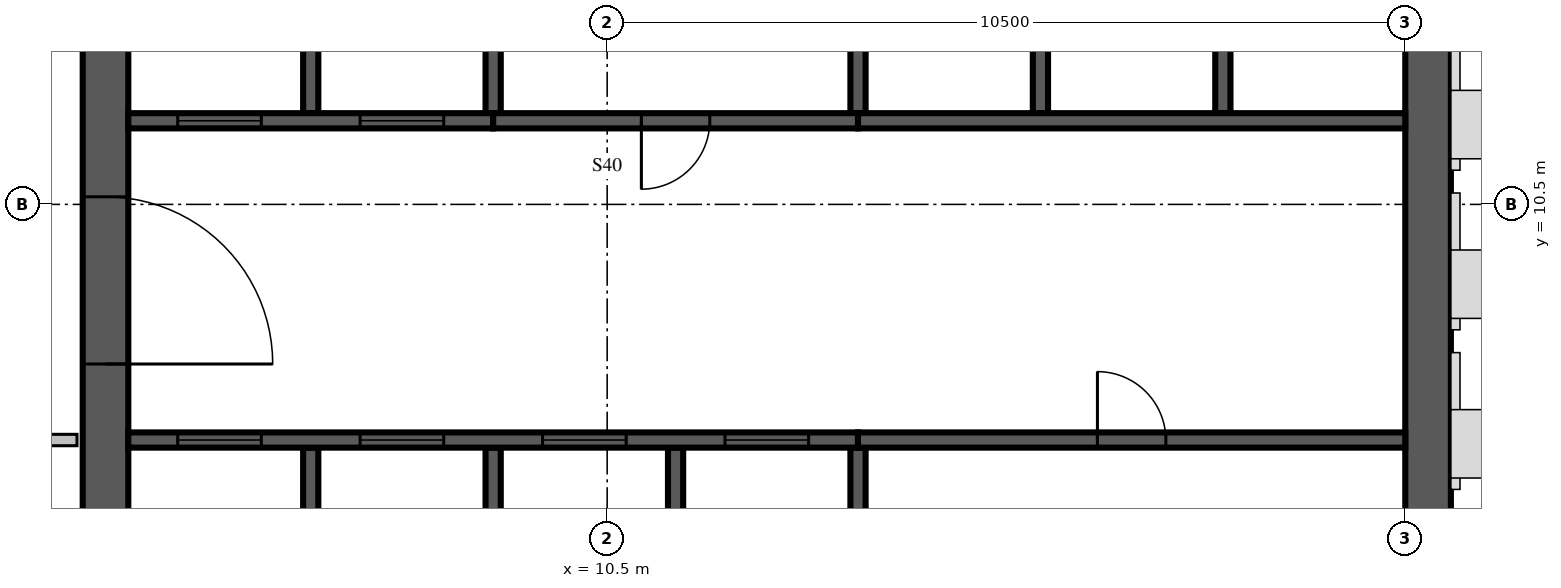
"""IFC4 building model, lengths in metres.
Left out: names, types, materials, properties, quantities, classifications, styles, units other than length and angle.
Written with IfcOpenShell. Run it as: python <this file> out.ifc"""

import sys

from ifc_helpers import new_model, si_unit, direction, frame, frame_2d, origin, place, context, subcontext, project, spatial, rectangle, extrude, source, transform, mapped, element, fill, save


model = new_model("IFC4")
c1 = context("Model", 3, precision=1e-05, world=origin(), true_north=direction((0.0, 1.0)))
c2 = subcontext(c1, "Body", "Model", "MODEL_VIEW")
j1 = project(units=[si_unit("LENGTHUNIT", "METRE"), si_unit("PLANEANGLEUNIT", "RADIAN")], contexts=[c1])
p1 = place(None, origin())
s1 = spatial("IfcSite", under=j1, at=p1, CompositionType="ELEMENT")
p2 = place(p1, origin())
s2 = spatial("IfcBuilding", under=s1, at=p2, CompositionType="ELEMENT")
p3 = place(p2, frame((0.0, 0.0, 344.0)))
s3 = spatial("IfcBuildingStorey", under=s2, at=p3, CompositionType="ELEMENT", Elevation=344.0)
m1 = source(origin(), c2, "Body", "SweptSolid", [
    extrude(rectangle(XDim=17.4, YDim=0.6, at=frame_2d((8.7, 0.0))), origin(), (0.0, 0.0, 1.0), 3.5),
])
p4 = place(p3, frame((3.9, 4.2, 0.0), z_axis=(0.0, 0.0, 1.0), x_axis=(0.0, 1.0, 0.0)))
e1 = element("IfcWall", 1, at=p4, inside=s3, PredefinedType="SHEAR", context=c2, shape_type="MappedRepresentation", body=[
    mapped(m1, transform((0.0, 0.0, 0.0), scale=1.0)),
])
m2 = source(origin(), c2, "Body", "SweptSolid", [
    extrude(rectangle(XDim=2.2, YDim=2.1, at=frame_2d((1.1, 1.05))), frame((0.0, 0.31, 0.0), z_axis=(0.0, -1.0, 0.0), x_axis=(1.0, 0.0, 0.0)), (0.0, 0.0, 1.0), 0.62),
])
p5 = place(p4, frame((4.2, 0.0, 0.0)))
e2 = element("IfcOpeningElement", 2, at=p5, cuts=e1, PredefinedType="OPENING", context=c2, shape_type="MappedRepresentation", body=[
    mapped(m2, transform((0.0, 0.0, 0.0), scale=1.0)),
])
m3 = source(origin(), c2, "Body", "SweptSolid", [
    extrude(rectangle(XDim=16.8, YDim=0.6, at=frame_2d((8.4, 0.0))), origin(), (0.0, 0.0, 1.0), 3.5),
])
p6 = place(p3, frame((21.3, 4.2, 0.0), z_axis=(0.0, 0.0, 1.0), x_axis=(0.0, 1.0, 0.0)))
e3 = element("IfcWall", 3, at=p6, inside=s3, PredefinedType="SHEAR", context=c2, shape_type="MappedRepresentation", body=[
    mapped(m3, transform((0.0, 0.0, 0.0), scale=1.0)),
])
m4 = source(origin(), c2, "Body", "SweptSolid", [
    extrude(rectangle(XDim=1.2, YDim=2.4, at=frame_2d((0.6, 1.2))), frame((0.0, 0.31, 0.0), z_axis=(0.0, -1.0, 0.0), x_axis=(1.0, 0.0, 0.0)), (0.0, 0.0, 1.0), 0.62),
])
p7 = place(p6, frame((12.0, 0.0, 0.6)))
e4 = element("IfcOpeningElement", 4, at=p7, cuts=e3, PredefinedType="OPENING", context=c2, shape_type="MappedRepresentation", body=[
    mapped(m4, transform((0.0, 0.0, 0.0), scale=1.0)),
])
m5 = source(origin(), c2, "Body", "SweptSolid", [
    extrude(rectangle(XDim=3.1, YDim=0.2, at=frame_2d((1.55, 0.0))), origin(), (0.0, 0.0, 1.0), 3.5),
])
for number, where, z_axis, x_axis in (
    (5, (6.6, 4.2, 0.0), (0.0, 0.0, 1.0), (0.0, 1.0, 0.0)),
    (6, (9.0, 4.2, 0.0), (0.0, 0.0, 1.0), (0.0, 1.0, 0.0)),
    (7, (11.4, 4.2, 0.0), (0.0, 0.0, 1.0), (0.0, 1.0, 0.0)),
):
    element("IfcWall", number, at=place(p3, frame(where, z_axis=z_axis, x_axis=x_axis)), inside=s3, PredefinedType="SOLIDWALL", context=c2, shape_type="MappedRepresentation", body=[
        mapped(m5, transform((0.0, 0.0, 0.0), scale=1.0)),
    ])
m6 = source(origin(), c2, "Body", "SweptSolid", [
    extrude(rectangle(XDim=3.1, YDim=0.2, at=frame_2d((1.55, 0.0))), origin(), (0.0, 0.0, 1.0), 3.1),
])
p8 = place(p3, frame((13.8, 4.2, 0.0), z_axis=(0.0, 0.0, 1.0), x_axis=(0.0, 1.0, 0.0)))
e8 = element("IfcWall", 8, at=p8, inside=s3, PredefinedType="SOLIDWALL", context=c2, shape_type="MappedRepresentation", body=[
    mapped(m6, transform((0.0, 0.0, 0.0), scale=1.0)),
])
m7 = source(origin(), c2, "Body", "SweptSolid", [
    extrude(rectangle(XDim=3.0, YDim=0.2, at=frame_2d((1.5, 0.0))), origin(), (0.0, 0.0, 1.0), 3.5),
])
p9 = place(p3, frame((6.6, 11.7, 0.0), z_axis=(0.0, 0.0, 1.0), x_axis=(0.0, 1.0, 0.0)))
e9 = element("IfcWall", 9, at=p9, inside=s3, PredefinedType="SOLIDWALL", context=c2, shape_type="MappedRepresentation", body=[
    mapped(m7, transform((0.0, 0.0, 0.0), scale=1.0)),
])
m8 = source(origin(), c2, "Body", "SweptSolid", [
    extrude(rectangle(XDim=3.0, YDim=0.2, at=frame_2d((1.5, 0.0))), origin(), (0.0, 0.0, 1.0), 3.1),
])
for number, where, z_axis, x_axis in (
    (10, (9.0, 11.7, 0.0), (0.0, 0.0, 1.0), (0.0, 1.0, 0.0)),
    (11, (13.8, 11.7, 0.0), (0.0, 0.0, 1.0), (0.0, 1.0, 0.0)),
):
    element("IfcWall", number, at=place(p3, frame(where, z_axis=z_axis, x_axis=x_axis)), inside=s3, PredefinedType="SOLIDWALL", context=c2, shape_type="MappedRepresentation", body=[
        mapped(m8, transform((0.0, 0.0, 0.0), scale=1.0)),
    ])
for number, where, z_axis, x_axis in (
    (12, (16.2, 11.7, 0.0), (0.0, 0.0, 1.0), (0.0, 1.0, 0.0)),
    (13, (18.6, 11.7, 0.0), (0.0, 0.0, 1.0), (0.0, 1.0, 0.0)),
):
    element("IfcWall", number, at=place(p3, frame(where, z_axis=z_axis, x_axis=x_axis)), inside=s3, PredefinedType="SOLIDWALL", context=c2, shape_type="MappedRepresentation", body=[
        mapped(m7, transform((0.0, 0.0, 0.0), scale=1.0)),
    ])
m9 = source(origin(), c2, "Body", "SweptSolid", [
    extrude(rectangle(XDim=9.6, YDim=0.2, at=frame_2d((4.8, 0.0))), origin(), (0.0, 0.0, 1.0), 3.5),
])
p10 = place(p3, frame((4.2, 7.4, 0.0), z_axis=(0.0, 0.0, 1.0), x_axis=(1.0, 0.0, 0.0)))
e14 = element("IfcWall", 14, at=p10, inside=s3, PredefinedType="SOLIDWALL", context=c2, shape_type="MappedRepresentation", body=[
    mapped(m9, transform((0.0, 0.0, 0.0), scale=1.0)),
])
m10 = source(origin(), c2, "Body", "SweptSolid", [
    extrude(rectangle(XDim=1.1, YDim=2.1, at=frame_2d((0.55, 1.05))), frame((0.0, 0.11, 0.0), z_axis=(0.0, -1.0, 0.0), x_axis=(1.0, 0.0, 0.0)), (0.0, 0.0, 1.0), 0.22),
])
p11 = place(p10, frame((0.65, 0.0, 0.0)))
e15 = element("IfcOpeningElement", 15, at=p11, cuts=e14, PredefinedType="OPENING", context=c2, shape_type="MappedRepresentation", body=[
    mapped(m10, transform((0.0, 0.0, 0.0), scale=1.0)),
])
p12 = place(p10, frame((3.05, 0.0, 0.0)))
e16 = element("IfcOpeningElement", 16, at=p12, cuts=e14, PredefinedType="OPENING", context=c2, shape_type="MappedRepresentation", body=[
    mapped(m10, transform((0.0, 0.0, 0.0), scale=1.0)),
])
p13 = place(p10, frame((5.45, 0.0, 0.0)))
e17 = element("IfcOpeningElement", 17, at=p13, cuts=e14, PredefinedType="OPENING", context=c2, shape_type="MappedRepresentation", body=[
    mapped(m10, transform((0.0, 0.0, 0.0), scale=1.0)),
])
p14 = place(p10, frame((7.85, 0.0, 0.0)))
e18 = element("IfcOpeningElement", 18, at=p14, cuts=e14, PredefinedType="OPENING", context=c2, shape_type="MappedRepresentation", body=[
    mapped(m10, transform((0.0, 0.0, 0.0), scale=1.0)),
])
m11 = source(origin(), c2, "Body", "SweptSolid", [
    extrude(rectangle(XDim=7.2, YDim=0.2, at=frame_2d((3.6, 0.0))), origin(), (0.0, 0.0, 1.0), 3.1),
])
p15 = place(p3, frame((13.8, 7.4, 0.0), z_axis=(0.0, 0.0, 1.0), x_axis=(1.0, 0.0, 0.0)))
e19 = element("IfcWall", 19, at=p15, inside=s3, PredefinedType="SOLIDWALL", context=c2, shape_type="MappedRepresentation", body=[
    mapped(m11, transform((0.0, 0.0, 0.0), scale=1.0)),
])
m12 = source(origin(), c2, "Body", "SweptSolid", [
    extrude(rectangle(XDim=0.9, YDim=2.1, at=frame_2d((0.45, 1.05))), frame((0.0, 0.11, 0.0), z_axis=(0.0, -1.0, 0.0), x_axis=(1.0, 0.0, 0.0)), (0.0, 0.0, 1.0), 0.22),
])
p16 = place(p15, frame((3.15, 0.0, 0.0)))
e20 = element("IfcOpeningElement", 20, at=p16, cuts=e19, PredefinedType="OPENING", context=c2, shape_type="MappedRepresentation", body=[
    mapped(m12, transform((0.0, 0.0, 0.0), scale=1.0)),
])
m13 = source(origin(), c2, "Body", "SweptSolid", [
    extrude(rectangle(XDim=4.8, YDim=0.2, at=frame_2d((2.4, 0.0))), origin(), (0.0, 0.0, 1.0), 3.5),
])
p17 = place(p3, frame((4.2, 11.6, 0.0), z_axis=(0.0, 0.0, 1.0), x_axis=(1.0, 0.0, 0.0)))
e21 = element("IfcWall", 21, at=p17, inside=s3, PredefinedType="SOLIDWALL", context=c2, shape_type="MappedRepresentation", body=[
    mapped(m13, transform((0.0, 0.0, 0.0), scale=1.0)),
])
p18 = place(p17, frame((0.65, 0.0, 0.0)))
e22 = element("IfcOpeningElement", 22, at=p18, cuts=e21, PredefinedType="OPENING", context=c2, shape_type="MappedRepresentation", body=[
    mapped(m10, transform((0.0, 0.0, 0.0), scale=1.0)),
])
p19 = place(p17, frame((3.05, 0.0, 0.0)))
e23 = element("IfcOpeningElement", 23, at=p19, cuts=e21, PredefinedType="OPENING", context=c2, shape_type="MappedRepresentation", body=[
    mapped(m10, transform((0.0, 0.0, 0.0), scale=1.0)),
])
m14 = source(origin(), c2, "Body", "SweptSolid", [
    extrude(rectangle(XDim=4.8, YDim=0.2, at=frame_2d((2.4, 0.0))), origin(), (0.0, 0.0, 1.0), 3.1),
])
p20 = place(p3, frame((9.0, 11.6, 0.0), z_axis=(0.0, 0.0, 1.0), x_axis=(1.0, 0.0, 0.0)))
e24 = element("IfcWall", 24, at=p20, inside=s3, PredefinedType="SOLIDWALL", context=c2, shape_type="MappedRepresentation", body=[
    mapped(m14, transform((0.0, 0.0, 0.0), scale=1.0)),
])
p21 = place(p20, frame((1.95, 0.0, 0.0)))
e25 = element("IfcOpeningElement", 25, at=p21, cuts=e24, PredefinedType="OPENING", context=c2, shape_type="MappedRepresentation", body=[
    mapped(m12, transform((0.0, 0.0, 0.0), scale=1.0)),
])
m15 = source(origin(), c2, "Body", "SweptSolid", [
    extrude(rectangle(XDim=7.2, YDim=0.2, at=frame_2d((3.6, 0.0))), origin(), (0.0, 0.0, 1.0), 3.5),
])
p22 = place(p3, frame((13.8, 11.6, 0.0), z_axis=(0.0, 0.0, 1.0), x_axis=(1.0, 0.0, 0.0)))
e26 = element("IfcWall", 26, at=p22, inside=s3, PredefinedType="SOLIDWALL", context=c2, shape_type="MappedRepresentation", body=[
    mapped(m15, transform((0.0, 0.0, 0.0), scale=1.0)),
])
m16 = source(origin(), c2, "Body", "SweptSolid", [
    extrude(rectangle(XDim=3.225, YDim=0.15, at=frame_2d((1.613, 0.0))), origin(), (0.0, 0.0, 1.0), 3.1),
])
p23 = place(p3, frame((0.3, 7.4, 0.0), z_axis=(0.0, 0.0, 1.0), x_axis=(1.0, 0.0, 0.0)))
e27 = element("IfcWall", 27, at=p23, inside=s3, PredefinedType="PARTITIONING", context=c2, shape_type="MappedRepresentation", body=[
    mapped(m16, transform((0.0, 0.0, 0.0), scale=1.0)),
])
m17 = source(origin(), c2, "Body", "SweptSolid", [
    extrude(rectangle(XDim=0.9, YDim=2.1, at=frame_2d((0.45, 1.05))), frame((0.0, 0.085, 0.0), z_axis=(0.0, -1.0, 0.0), x_axis=(1.0, 0.0, 0.0)), (0.0, 0.0, 1.0), 0.17),
])
p24 = place(p23, frame((1.2, 0.0, 0.0)))
e28 = element("IfcOpeningElement", 28, at=p24, cuts=e27, PredefinedType="OPENING", context=c2, shape_type="MappedRepresentation", body=[
    mapped(m17, transform((0.0, 0.0, 0.0), scale=1.0)),
])
m18 = source(origin(), c2, "Body", "SweptSolid", [
    extrude(rectangle(XDim=1.1, YDim=2.1, at=frame_2d((0.55, 1.05))), frame((0.0, 0.025, 0.0), z_axis=(0.0, -1.0, 0.0), x_axis=(1.0, 0.0, 0.0)), (0.0, 0.0, 1.0), 0.05),
])
p25 = place(p11, origin())
e29 = element("IfcDoor", 29, at=p25, inside=s3, OperationType="SLIDING_TO_LEFT", PredefinedType="DOOR", context=c2, shape_type="MappedRepresentation", body=[
    mapped(m18, transform((0.0, 0.0, 0.0), scale=1.0)),
])
fill(e15, e29)
p26 = place(p12, origin())
e30 = element("IfcDoor", 30, at=p26, inside=s3, OperationType="SLIDING_TO_LEFT", PredefinedType="DOOR", context=c2, shape_type="MappedRepresentation", body=[
    mapped(m18, transform((0.0, 0.0, 0.0), scale=1.0)),
])
fill(e16, e30)
p27 = place(p13, origin())
e31 = element("IfcDoor", 31, at=p27, inside=s3, OperationType="SLIDING_TO_LEFT", PredefinedType="DOOR", context=c2, shape_type="MappedRepresentation", body=[
    mapped(m18, transform((0.0, 0.0, 0.0), scale=1.0)),
])
fill(e17, e31)
p28 = place(p14, origin())
e32 = element("IfcDoor", 32, at=p28, inside=s3, OperationType="SLIDING_TO_LEFT", PredefinedType="DOOR", context=c2, shape_type="MappedRepresentation", body=[
    mapped(m18, transform((0.0, 0.0, 0.0), scale=1.0)),
])
fill(e18, e32)
m19 = source(origin(), c2, "Body", "SweptSolid", [
    extrude(rectangle(XDim=0.9, YDim=2.1, at=frame_2d((0.45, 1.05))), frame((0.0, 0.025, 0.0), z_axis=(0.0, -1.0, 0.0), x_axis=(1.0, 0.0, 0.0)), (0.0, 0.0, 1.0), 0.05),
])
p29 = place(p16, origin())
e33 = element("IfcDoor", 33, at=p29, inside=s3, OperationType="SINGLE_SWING_LEFT", PredefinedType="DOOR", context=c2, shape_type="MappedRepresentation", body=[
    mapped(m19, transform((0.0, 0.0, 0.0), scale=1.0)),
])
fill(e20, e33)
p30 = place(p18, origin())
e34 = element("IfcDoor", 34, at=p30, inside=s3, OperationType="SLIDING_TO_LEFT", PredefinedType="DOOR", context=c2, shape_type="MappedRepresentation", body=[
    mapped(m18, transform((0.0, 0.0, 0.0), scale=1.0)),
])
fill(e22, e34)
p31 = place(p19, origin())
e35 = element("IfcDoor", 35, at=p31, inside=s3, OperationType="SLIDING_TO_LEFT", PredefinedType="DOOR", context=c2, shape_type="MappedRepresentation", body=[
    mapped(m18, transform((0.0, 0.0, 0.0), scale=1.0)),
])
fill(e23, e35)
p32 = place(p21, origin())
e36 = element("IfcDoor", 36, at=p32, inside=s3, OperationType="SINGLE_SWING_RIGHT", PredefinedType="DOOR", context=c2, shape_type="MappedRepresentation", body=[
    mapped(m19, transform((0.0, 0.0, 0.0), scale=1.0)),
])
fill(e25, e36)
m20 = source(origin(), c2, "Body", "SweptSolid", [
    extrude(rectangle(XDim=2.2, YDim=2.1, at=frame_2d((1.1, 1.05))), frame((0.0, 0.025, 0.0), z_axis=(0.0, -1.0, 0.0), x_axis=(1.0, 0.0, 0.0)), (0.0, 0.0, 1.0), 0.05),
])
p33 = place(p5, origin())
e37 = element("IfcDoor", 37, at=p33, inside=s3, OperationType="DOUBLE_DOOR_SINGLE_SWING", PredefinedType="DOOR", context=c2, shape_type="MappedRepresentation", body=[
    mapped(m20, transform((0.0, 0.0, 0.0), scale=1.0)),
])
fill(e2, e37)
save(model, sys.argv[1])
